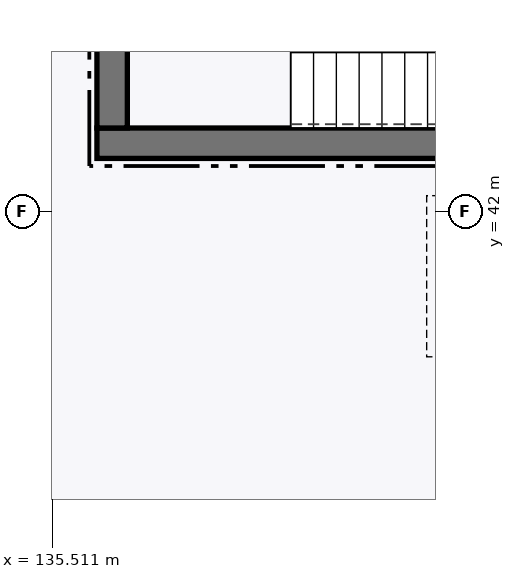
"""IFC4 building model, lengths in metres.
Left out: names, types, materials, properties, quantities, classifications, styles, units other than length and angle.
Written with IfcOpenShell. Run it as: python <this file> out.ifc"""

import sys

from ifc_helpers import new_model, si_unit, direction, frame, frame_2d, origin, place, context, subcontext, project, spatial, rectangle, extrude, element, save


model = new_model("IFC4")
c1 = context("Model", 3, precision=1e-05, world=origin(), true_north=direction((0.0, 1.0)))
c2 = subcontext(c1, "Body", "Model", "MODEL_VIEW")
j1 = project(units=[si_unit("LENGTHUNIT", "METRE"), si_unit("PLANEANGLEUNIT", "RADIAN")], contexts=[c1])
p1 = place(None, origin())
s1 = spatial("IfcSite", under=j1, at=p1, CompositionType="ELEMENT")
p2 = place(p1, origin())
s2 = spatial("IfcBuilding", under=s1, at=p2, CompositionType="ELEMENT")
p3 = place(p2, frame((0.0, 0.0, 6.0)))
s3 = spatial("IfcBuildingStorey", under=s2, at=p3, CompositionType="ELEMENT", Elevation=6.0)
p4 = place(p3, frame((136.1, 42.9, 0.0), z_axis=(0.0, 0.0, 1.0), x_axis=(1.0, 0.0, 0.0)))
e1 = element("IfcWall", 1, at=p4, inside=s3, PredefinedType="SHEAR", context=c2, shape_type="SweptSolid", body=[
    extrude(rectangle(XDim=11.0, YDim=0.4, at=frame_2d((5.5, 0.0))), origin(), (0.0, 0.0, 1.0), 5.145),
])
p5 = place(p3, frame((136.3, 47.3, 0.0), z_axis=(0.0, 0.0, 1.0), x_axis=(0.0, -1.0, 0.0)))
e2 = element("IfcWall", 2, at=p5, inside=s3, PredefinedType="SHEAR", context=c2, shape_type="SweptSolid", body=[
    extrude(rectangle(XDim=4.2, YDim=0.4, at=frame_2d((2.1, 0.0))), origin(), (0.0, 0.0, 1.0), 5.145),
])
p6 = place(p5, frame((1.35, 0.0, 0.0)))
e3 = element("IfcOpeningElement", 3, at=p6, cuts=e2, PredefinedType="OPENING", context=c2, shape_type="SweptSolid", body=[
    extrude(rectangle(XDim=1.5, YDim=2.15, at=frame_2d((0.75, 1.075))), frame((0.0, 0.21, 0.0), z_axis=(0.0, -1.0, 0.0), x_axis=(1.0, 0.0, 0.0)), (0.0, 0.0, 1.0), 0.42),
])
save(model, sys.argv[1])
